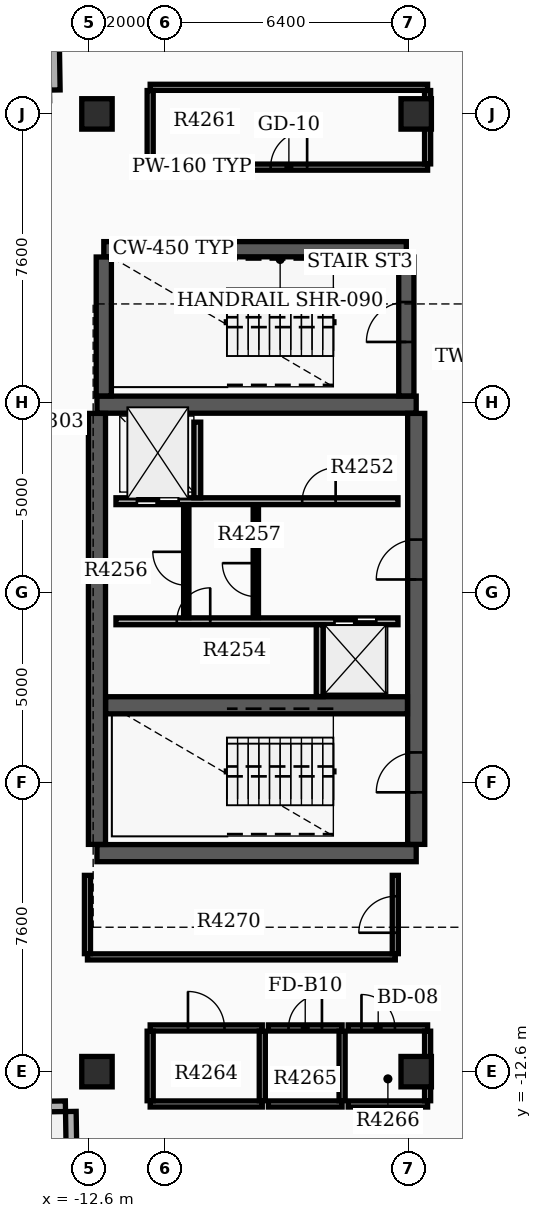
"""IFC4 building model, lengths in metres.
Left out: names, types, materials, properties, quantities, classifications, styles, units other than length and angle.
Written with IfcOpenShell. Run it as: python <this file> out.ifc"""

import sys

from ifc_helpers import new_model, si_unit, direction, frame, frame_2d, origin, origin_2d, place, context, subcontext, project, spatial, rectangle, extrude, element, fill, save


model = new_model("IFC4")
c1 = context("Model", 3, precision=1e-05, world=origin(), true_north=direction((0.0, 1.0)))
c2 = subcontext(c1, "Body", "Model", "MODEL_VIEW")
j1 = project(units=[si_unit("LENGTHUNIT", "METRE"), si_unit("PLANEANGLEUNIT", "RADIAN")], contexts=[c1])
p1 = place(None, origin())
s1 = spatial("IfcSite", under=j1, at=p1, CompositionType="ELEMENT")
p2 = place(p1, origin())
s2 = spatial("IfcBuilding", under=s1, at=p2, CompositionType="ELEMENT")
p3 = place(p2, frame((0.0, 0.0, 269.4)))
s3 = spatial("IfcBuildingStorey", under=s2, at=p3, CompositionType="ELEMENT", Elevation=269.4)
for number, where, z_axis, x_axis in (
    (1, (-12.4, -6.85, 0.0), (0.0, 0.0, 1.0), (1.0, 0.0, 0.0)),
    (2, (-12.4, 4.95, 0.0), (0.0, 0.0, 1.0), (1.0, 0.0, 0.0)),
):
    element("IfcWall", number, at=place(p3, frame(where, z_axis=z_axis, x_axis=x_axis)), inside=s3, PredefinedType="SHEAR", context=c2, shape_type="SweptSolid", body=[
        extrude(rectangle(XDim=8.4, YDim=0.45, at=frame_2d((4.2, 0.0))), origin(), (0.0, 0.0, 1.0), 3.7),
    ])
p4 = place(p3, frame((-12.4, -6.62, 0.0), z_axis=(0.0, 0.0, 1.0), x_axis=(0.0, 1.0, 0.0)))
e3 = element("IfcWall", 3, at=p4, inside=s3, PredefinedType="SHEAR", context=c2, shape_type="SweptSolid", body=[
    extrude(rectangle(XDim=11.34, YDim=0.45, at=frame_2d((5.67, 0.0))), origin(), (0.0, 0.0, 1.0), 3.7),
])
p5 = place(p3, frame((-4.0, -6.62, 0.0), z_axis=(0.0, 0.0, 1.0), x_axis=(0.0, 1.0, 0.0)))
e4 = element("IfcWall", 4, at=p5, inside=s3, PredefinedType="SHEAR", context=c2, shape_type="SweptSolid", body=[
    extrude(rectangle(XDim=11.34, YDim=0.45, at=frame_2d((5.67, 0.0))), origin(), (0.0, 0.0, 1.0), 3.7),
])
p6 = place(p5, frame((1.37, 0.0, 0.0)))
e5 = element("IfcOpeningElement", 5, at=p6, cuts=e4, PredefinedType="OPENING", context=c2, shape_type="SweptSolid", body=[
    extrude(rectangle(XDim=1.05, YDim=2.15, at=frame_2d((0.525, 1.075))), frame((0.0, 0.235, 0.0), z_axis=(0.0, -1.0, 0.0), x_axis=(1.0, 0.0, 0.0)), (0.0, 0.0, 1.0), 0.47),
])
p7 = place(p5, frame((6.97, 0.0, 0.0)))
e6 = element("IfcOpeningElement", 6, at=p7, cuts=e4, PredefinedType="OPENING", context=c2, shape_type="SweptSolid", body=[
    extrude(rectangle(XDim=1.05, YDim=2.15, at=frame_2d((0.525, 1.075))), frame((0.0, 0.235, 0.0), z_axis=(0.0, -1.0, 0.0), x_axis=(1.0, 0.0, 0.0)), (0.0, 0.0, 1.0), 0.47),
])
p8 = place(p3, frame((-12.17, -2.96, 0.0), z_axis=(0.0, 0.0, 1.0), x_axis=(1.0, 0.0, 0.0)))
e7 = element("IfcWall", 7, at=p8, inside=s3, PredefinedType="SHEAR", context=c2, shape_type="SweptSolid", body=[
    extrude(rectangle(XDim=7.94, YDim=0.45, at=frame_2d((3.97, 0.0))), origin(), (0.0, 0.0, 1.0), 3.7),
])
p9 = place(p3, frame((-12.22, 9.04, 0.0), z_axis=(0.0, 0.0, 1.0), x_axis=(1.0, 0.0, 0.0)))
e8 = element("IfcWall", 8, at=p9, inside=s3, PredefinedType="SHEAR", context=c2, shape_type="SweptSolid", body=[
    extrude(rectangle(XDim=7.96, YDim=0.4, at=frame_2d((3.98, 0.0))), origin(), (0.0, 0.0, 1.0), 3.7),
])
p10 = place(p3, frame((-12.22, 5.18, 0.0), z_axis=(0.0, 0.0, 1.0), x_axis=(0.0, 1.0, 0.0)))
e9 = element("IfcWall", 9, at=p10, inside=s3, PredefinedType="SHEAR", context=c2, shape_type="SweptSolid", body=[
    extrude(rectangle(XDim=3.655, YDim=0.4, at=frame_2d((1.828, 0.0))), origin(), (0.0, 0.0, 1.0), 3.7),
])
p11 = place(p3, frame((-4.26, 5.18, 0.0), z_axis=(0.0, 0.0, 1.0), x_axis=(0.0, 1.0, 0.0)))
e10 = element("IfcWall", 10, at=p11, inside=s3, PredefinedType="SHEAR", context=c2, shape_type="SweptSolid", body=[
    extrude(rectangle(XDim=3.655, YDim=0.4, at=frame_2d((1.828, 0.0))), origin(), (0.0, 0.0, 1.0), 3.7),
])
p12 = place(p11, frame((1.42, 0.0, 0.0)))
e11 = element("IfcOpeningElement", 11, at=p12, cuts=e10, PredefinedType="OPENING", context=c2, shape_type="SweptSolid", body=[
    extrude(rectangle(XDim=1.05, YDim=2.15, at=frame_2d((0.525, 1.075))), frame((0.0, 0.21, 0.0), z_axis=(0.0, -1.0, 0.0), x_axis=(1.0, 0.0, 0.0)), (0.0, 0.0, 1.0), 0.42),
])
for number, where, z_axis, x_axis in (
    (12, (-12.4, -12.6, 0.0), (0.0, 0.0, 1.0), (1.0, 0.0, 0.0)),
    (13, (-12.4, 12.6, 0.0), (0.0, 0.0, 1.0), (1.0, 0.0, 0.0)),
    (14, (-4.0, -12.6, 0.0), (0.0, 0.0, 1.0), (1.0, 0.0, 0.0)),
    (15, (-4.0, 12.6, 0.0), (0.0, 0.0, 1.0), (1.0, 0.0, 0.0)),
):
    element("IfcColumn", number, at=place(p3, frame(where, z_axis=z_axis, x_axis=x_axis)), inside=s3, PredefinedType="COLUMN", context=c2, shape_type="SweptSolid", body=[
        extrude(rectangle(XDim=0.8, YDim=0.8, at=origin_2d()), origin(), (0.0, 0.0, 1.0), 3.9),
    ])
p13 = place(p3, frame((-13.51, 13.229, 0.0), z_axis=(0.0, 0.0, 1.0), x_axis=(-0.015625635615, 0.999877912303, 0.0)))
e16 = element("IfcWall", 16, at=p13, inside=s3, PredefinedType="STANDARD", context=c2, shape_type="SweptSolid", body=[
    extrude(rectangle(XDim=1.5, YDim=0.28, at=frame_2d((0.75, 0.0))), origin(), (0.0, 0.0, 1.0), 3.18),
])
p14 = place(p3, frame((-14.449, -13.529, 0.0), z_axis=(0.0, 0.0, 1.0), x_axis=(0.999878147354, 0.015610587569, 0.0)))
e17 = element("IfcWall", 17, at=p14, inside=s3, PredefinedType="STANDARD", context=c2, shape_type="SweptSolid", body=[
    extrude(rectangle(XDim=1.22, YDim=0.28, at=frame_2d((0.61, 0.0))), origin(), (0.0, 0.0, 1.0), 3.18),
])
p15 = place(p3, frame((-13.087, -13.647, 0.0), z_axis=(0.0, 0.0, 1.0), x_axis=(0.015785793208, -0.999875396603, 0.0)))
e18 = element("IfcWall", 18, at=p15, inside=s3, PredefinedType="STANDARD", context=c2, shape_type="SweptSolid", body=[
    extrude(rectangle(XDim=1.5, YDim=0.28, at=frame_2d((0.75, 0.0))), origin(), (0.0, 0.0, 1.0), 3.18),
])
p16 = place(p3, frame((-11.9, 2.41, 0.0), z_axis=(0.0, 0.0, 1.0), x_axis=(1.0, 0.0, 0.0)))
e19 = element("IfcWall", 19, at=p16, inside=s3, PredefinedType="SOLIDWALL", context=c2, shape_type="SweptSolid", body=[
    extrude(rectangle(XDim=7.42, YDim=0.18, at=frame_2d((3.71, 0.0))), origin(), (0.0, 0.0, 1.0), 3.17),
])
p17 = place(p16, frame((0.55, 0.0, 0.0)))
e20 = element("IfcOpeningElement", 20, at=p17, cuts=e19, PredefinedType="OPENING", context=c2, shape_type="SweptSolid", body=[
    extrude(rectangle(XDim=1.1, YDim=2.15, at=frame_2d((0.55, 1.075))), frame((0.0, 0.1, 0.0), z_axis=(0.0, -1.0, 0.0), x_axis=(1.0, 0.0, 0.0)), (0.0, 0.0, 1.0), 0.2),
])
p18 = place(p16, frame((4.9, 0.0, 0.0)))
e21 = element("IfcOpeningElement", 21, at=p18, cuts=e19, PredefinedType="OPENING", context=c2, shape_type="SweptSolid", body=[
    extrude(rectangle(XDim=0.88, YDim=2.1, at=frame_2d((0.44, 1.05))), frame((0.0, 0.1, 0.0), z_axis=(0.0, -1.0, 0.0), x_axis=(1.0, 0.0, 0.0)), (0.0, 0.0, 1.0), 0.2),
])
p19 = place(p3, frame((-11.9, -0.75, 0.0), z_axis=(0.0, 0.0, 1.0), x_axis=(1.0, 0.0, 0.0)))
e22 = element("IfcWall", 22, at=p19, inside=s3, PredefinedType="SOLIDWALL", context=c2, shape_type="SweptSolid", body=[
    extrude(rectangle(XDim=7.42, YDim=0.18, at=frame_2d((3.71, 0.0))), origin(), (0.0, 0.0, 1.0), 3.17),
])
p20 = place(p19, frame((5.75, 0.0, 0.0)))
e23 = element("IfcOpeningElement", 23, at=p20, cuts=e22, PredefinedType="OPENING", context=c2, shape_type="SweptSolid", body=[
    extrude(rectangle(XDim=1.1, YDim=2.15, at=frame_2d((0.55, 1.075))), frame((0.0, 0.1, 0.0), z_axis=(0.0, -1.0, 0.0), x_axis=(1.0, 0.0, 0.0)), (0.0, 0.0, 1.0), 0.2),
])
p21 = place(p19, frame((1.6, 0.0, 0.0)))
e24 = element("IfcOpeningElement", 24, at=p21, cuts=e22, PredefinedType="OPENING", context=c2, shape_type="SweptSolid", body=[
    extrude(rectangle(XDim=0.88, YDim=2.1, at=frame_2d((0.44, 1.05))), frame((0.0, 0.1, 0.0), z_axis=(0.0, -1.0, 0.0), x_axis=(1.0, 0.0, 0.0)), (0.0, 0.0, 1.0), 0.2),
])
p22 = place(p3, frame((-9.76, 2.5, 0.0), z_axis=(0.0, 0.0, 1.0), x_axis=(0.0, 1.0, 0.0)))
e25 = element("IfcWall", 25, at=p22, inside=s3, PredefinedType="SOLIDWALL", context=c2, shape_type="SweptSolid", body=[
    extrude(rectangle(XDim=1.99, YDim=0.18, at=frame_2d((0.995, 0.0))), origin(), (0.0, 0.0, 1.0), 3.17),
])
p23 = place(p3, frame((-6.54, -2.73, 0.0), z_axis=(0.0, 0.0, 1.0), x_axis=(0.0, 1.0, 0.0)))
e26 = element("IfcWall", 26, at=p23, inside=s3, PredefinedType="SOLIDWALL", context=c2, shape_type="SweptSolid", body=[
    extrude(rectangle(XDim=1.89, YDim=0.18, at=frame_2d((0.945, 0.0))), origin(), (0.0, 0.0, 1.0), 3.17),
])
p24 = place(p3, frame((-8.22, -0.65, 0.0), z_axis=(0.0, 0.0, 1.0), x_axis=(0.0, 1.0, 0.0)))
e27 = element("IfcWall", 27, at=p24, inside=s3, PredefinedType="SOLIDWALL", context=c2, shape_type="SweptSolid", body=[
    extrude(rectangle(XDim=2.96, YDim=0.14, at=frame_2d((1.48, 0.0))), origin(), (0.0, 0.0, 1.0), 3.17),
])
p25 = place(p24, frame((0.55, 0.0, 0.0)))
e28 = element("IfcOpeningElement", 28, at=p25, cuts=e27, PredefinedType="OPENING", context=c2, shape_type="SweptSolid", body=[
    extrude(rectangle(XDim=0.88, YDim=2.1, at=frame_2d((0.44, 1.05))), frame((0.0, 0.08, 0.0), z_axis=(0.0, -1.0, 0.0), x_axis=(1.0, 0.0, 0.0)), (0.0, 0.0, 1.0), 0.16),
])
p26 = place(p3, frame((-10.05, -0.652, 0.0), z_axis=(0.0, 0.0, 1.0), x_axis=(0.0, 1.0, 0.0)))
e29 = element("IfcWall", 29, at=p26, inside=s3, PredefinedType="PARTITIONING", context=c2, shape_type="SweptSolid", body=[
    extrude(rectangle(XDim=2.962, YDim=0.14, at=frame_2d((1.481, 0.0))), origin(), (0.0, 0.0, 1.0), 3.17),
])
p27 = place(p26, frame((0.85, 0.0, 0.0)))
e30 = element("IfcOpeningElement", 30, at=p27, cuts=e29, PredefinedType="OPENING", context=c2, shape_type="SweptSolid", body=[
    extrude(rectangle(XDim=0.88, YDim=2.1, at=frame_2d((0.44, 1.05))), frame((0.0, 0.08, 0.0), z_axis=(0.0, -1.0, 0.0), x_axis=(1.0, 0.0, 0.0)), (0.0, 0.0, 1.0), 0.16),
])
p28 = place(p3, frame((-11.0, 11.2, 0.0), z_axis=(0.0, 0.0, 1.0), x_axis=(1.0, 0.0, 0.0)))
e31 = element("IfcWall", 31, at=p28, inside=s3, PredefinedType="PARTITIONING", context=c2, shape_type="SweptSolid", body=[
    extrude(rectangle(XDim=7.3, YDim=0.16, at=frame_2d((3.65, 0.0))), origin(), (0.0, 0.0, 1.0), 3.17),
])
p29 = place(p28, frame((3.17, 0.0, 0.0)))
e32 = element("IfcOpeningElement", 32, at=p29, cuts=e31, PredefinedType="OPENING", context=c2, shape_type="SweptSolid", body=[
    extrude(rectangle(XDim=0.96, YDim=2.15, at=frame_2d((0.48, 1.075))), frame((0.0, 0.09, 0.0), z_axis=(0.0, -1.0, 0.0), x_axis=(1.0, 0.0, 0.0)), (0.0, 0.0, 1.0), 0.18),
])
p30 = place(p3, frame((-11.0, 13.3, 0.0), z_axis=(0.0, 0.0, 1.0), x_axis=(1.0, 0.0, 0.0)))
e33 = element("IfcWall", 33, at=p30, inside=s3, PredefinedType="PARTITIONING", context=c2, shape_type="SweptSolid", body=[
    extrude(rectangle(XDim=7.3, YDim=0.16, at=frame_2d((3.65, 0.0))), origin(), (0.0, 0.0, 1.0), 3.17),
])
for number, where, z_axis, x_axis in (
    (34, (-11.0, 11.285, 0.0), (0.0, 0.0, 1.0), (0.0, 1.0, 0.0)),
    (35, (-3.7, 11.285, 0.0), (0.0, 0.0, 1.0), (0.0, 1.0, 0.0)),
):
    element("IfcWall", number, at=place(p3, frame(where, z_axis=z_axis, x_axis=x_axis)), inside=s3, PredefinedType="PARTITIONING", context=c2, shape_type="SweptSolid", body=[
        extrude(rectangle(XDim=1.93, YDim=0.16, at=frame_2d((0.965, 0.0))), origin(), (0.0, 0.0, 1.0), 3.17),
    ])
p31 = place(p3, frame((-11.0, -13.45, 0.0), z_axis=(0.0, 0.0, 1.0), x_axis=(1.0, 0.0, 0.0)))
e36 = element("IfcWall", 36, at=p31, inside=s3, PredefinedType="PARTITIONING", context=c2, shape_type="SweptSolid", body=[
    extrude(rectangle(XDim=2.95, YDim=0.16, at=frame_2d((1.475, 0.0))), origin(), (0.0, 0.0, 1.0), 3.17),
])
p32 = place(p3, frame((-11.0, -11.45, 0.0), z_axis=(0.0, 0.0, 1.0), x_axis=(1.0, 0.0, 0.0)))
e37 = element("IfcWall", 37, at=p32, inside=s3, PredefinedType="PARTITIONING", context=c2, shape_type="SweptSolid", body=[
    extrude(rectangle(XDim=2.95, YDim=0.16, at=frame_2d((1.475, 0.0))), origin(), (0.0, 0.0, 1.0), 3.17),
])
p33 = place(p32, frame((0.995, 0.0, 0.0)))
e38 = element("IfcOpeningElement", 38, at=p33, cuts=e37, PredefinedType="OPENING", context=c2, shape_type="SweptSolid", body=[
    extrude(rectangle(XDim=0.96, YDim=2.15, at=frame_2d((0.48, 1.075))), frame((0.0, 0.09, 0.0), z_axis=(0.0, -1.0, 0.0), x_axis=(1.0, 0.0, 0.0)), (0.0, 0.0, 1.0), 0.18),
])
for number, where, z_axis, x_axis in (
    (39, (-11.0, -13.365, 0.0), (0.0, 0.0, 1.0), (0.0, 1.0, 0.0)),
    (40, (-8.05, -13.365, 0.0), (0.0, 0.0, 1.0), (0.0, 1.0, 0.0)),
):
    element("IfcWall", number, at=place(p3, frame(where, z_axis=z_axis, x_axis=x_axis)), inside=s3, PredefinedType="PARTITIONING", context=c2, shape_type="SweptSolid", body=[
        extrude(rectangle(XDim=1.83, YDim=0.16, at=frame_2d((0.915, 0.0))), origin(), (0.0, 0.0, 1.0), 3.17),
    ])
p34 = place(p3, frame((-7.89, -13.45, 0.0), z_axis=(0.0, 0.0, 1.0), x_axis=(1.0, 0.0, 0.0)))
e41 = element("IfcWall", 41, at=p34, inside=s3, PredefinedType="PARTITIONING", context=c2, shape_type="SweptSolid", body=[
    extrude(rectangle(XDim=1.94, YDim=0.16, at=frame_2d((0.97, 0.0))), origin(), (0.0, 0.0, 1.0), 3.17),
])
p35 = place(p3, frame((-7.89, -11.45, 0.0), z_axis=(0.0, 0.0, 1.0), x_axis=(1.0, 0.0, 0.0)))
e42 = element("IfcWall", 42, at=p35, inside=s3, PredefinedType="PARTITIONING", context=c2, shape_type="SweptSolid", body=[
    extrude(rectangle(XDim=1.94, YDim=0.16, at=frame_2d((0.97, 0.0))), origin(), (0.0, 0.0, 1.0), 3.17),
])
p36 = place(p35, frame((0.53, 0.0, 0.0)))
e43 = element("IfcOpeningElement", 43, at=p36, cuts=e42, PredefinedType="OPENING", context=c2, shape_type="SweptSolid", body=[
    extrude(rectangle(XDim=0.88, YDim=2.1, at=frame_2d((0.44, 1.05))), frame((0.0, 0.09, 0.0), z_axis=(0.0, -1.0, 0.0), x_axis=(1.0, 0.0, 0.0)), (0.0, 0.0, 1.0), 0.18),
])
p37 = place(p3, frame((-5.95, -13.365, 0.0), z_axis=(0.0, 0.0, 1.0), x_axis=(0.0, 1.0, 0.0)))
e44 = element("IfcWall", 44, at=p37, inside=s3, PredefinedType="PARTITIONING", context=c2, shape_type="SweptSolid", body=[
    extrude(rectangle(XDim=1.83, YDim=0.16, at=frame_2d((0.915, 0.0))), origin(), (0.0, 0.0, 1.0), 3.17),
])
p38 = place(p3, frame((-5.79, -13.45, 0.0), z_axis=(0.0, 0.0, 1.0), x_axis=(1.0, 0.0, 0.0)))
e45 = element("IfcWall", 45, at=p38, inside=s3, PredefinedType="PARTITIONING", context=c2, shape_type="SweptSolid", body=[
    extrude(rectangle(XDim=2.09, YDim=0.16, at=frame_2d((1.045, 0.0))), origin(), (0.0, 0.0, 1.0), 3.17),
])
p39 = place(p3, frame((-5.79, -11.45, 0.0), z_axis=(0.0, 0.0, 1.0), x_axis=(1.0, 0.0, 0.0)))
e46 = element("IfcWall", 46, at=p39, inside=s3, PredefinedType="PARTITIONING", context=c2, shape_type="SweptSolid", body=[
    extrude(rectangle(XDim=2.09, YDim=0.16, at=frame_2d((1.045, 0.0))), origin(), (0.0, 0.0, 1.0), 3.17),
])
p40 = place(p39, frame((0.35, 0.0, 0.0)))
e47 = element("IfcOpeningElement", 47, at=p40, cuts=e46, PredefinedType="OPENING", context=c2, shape_type="SweptSolid", body=[
    extrude(rectangle(XDim=0.88, YDim=2.15, at=frame_2d((0.44, 1.075))), frame((0.0, 0.09, 0.0), z_axis=(0.0, -1.0, 0.0), x_axis=(1.0, 0.0, 0.0)), (0.0, 0.0, 1.0), 0.18),
])
p41 = place(p3, frame((-3.7, -13.365, 0.0), z_axis=(0.0, 0.0, 1.0), x_axis=(0.0, 1.0, 0.0)))
e48 = element("IfcWall", 48, at=p41, inside=s3, PredefinedType="PARTITIONING", context=c2, shape_type="SweptSolid", body=[
    extrude(rectangle(XDim=1.83, YDim=0.16, at=frame_2d((0.915, 0.0))), origin(), (0.0, 0.0, 1.0), 3.17),
])
p42 = place(p3, frame((-12.65, -9.58, 0.0), z_axis=(0.0, 0.0, 1.0), x_axis=(1.0, 0.0, 0.0)))
e49 = element("IfcWall", 49, at=p42, inside=s3, PredefinedType="PARTITIONING", context=c2, shape_type="SweptSolid", body=[
    extrude(rectangle(XDim=8.1, YDim=0.16, at=frame_2d((4.05, 0.0))), origin(), (0.0, 0.0, 1.0), 3.17),
])
p43 = place(p3, frame((-12.65, -9.495, 0.0), z_axis=(0.0, 0.0, 1.0), x_axis=(0.0, 1.0, 0.0)))
e50 = element("IfcWall", 50, at=p43, inside=s3, PredefinedType="PARTITIONING", context=c2, shape_type="SweptSolid", body=[
    extrude(rectangle(XDim=2.06, YDim=0.16, at=frame_2d((1.03, 0.0))), origin(), (0.0, 0.0, 1.0), 3.17),
])
p44 = place(p3, frame((-4.55, -9.495, 0.0), z_axis=(0.0, 0.0, 1.0), x_axis=(0.0, 1.0, 0.0)))
e51 = element("IfcWall", 51, at=p44, inside=s3, PredefinedType="PARTITIONING", context=c2, shape_type="SweptSolid", body=[
    extrude(rectangle(XDim=2.06, YDim=0.16, at=frame_2d((1.03, 0.0))), origin(), (0.0, 0.0, 1.0), 3.17),
])
p45 = place(p44, frame((0.55, 0.0, 0.0)))
e52 = element("IfcOpeningElement", 52, at=p45, cuts=e51, PredefinedType="OPENING", context=c2, shape_type="SweptSolid", body=[
    extrude(rectangle(XDim=0.96, YDim=2.15, at=frame_2d((0.48, 1.075))), frame((0.0, 0.09, 0.0), z_axis=(0.0, -1.0, 0.0), x_axis=(1.0, 0.0, 0.0)), (0.0, 0.0, 1.0), 0.18),
])
p46 = place(p6, origin())
e53 = element("IfcDoor", 53, at=p46, inside=s3, OperationType="SINGLE_SWING_LEFT", PredefinedType="DOOR", context=c2, shape_type="SweptSolid", body=[
    extrude(rectangle(XDim=1.05, YDim=2.15, at=frame_2d((0.525, 1.075))), frame((0.0, 0.025, 0.0), z_axis=(0.0, -1.0, 0.0), x_axis=(1.0, 0.0, 0.0)), (0.0, 0.0, 1.0), 0.05),
])
fill(e5, e53)
p47 = place(p7, origin())
e54 = element("IfcDoor", 54, at=p47, inside=s3, OperationType="SINGLE_SWING_LEFT", PredefinedType="DOOR", context=c2, shape_type="SweptSolid", body=[
    extrude(rectangle(XDim=1.05, YDim=2.15, at=frame_2d((0.525, 1.075))), frame((0.0, 0.025, 0.0), z_axis=(0.0, -1.0, 0.0), x_axis=(1.0, 0.0, 0.0)), (0.0, 0.0, 1.0), 0.05),
])
fill(e6, e54)
p48 = place(p12, origin())
e55 = element("IfcDoor", 55, at=p48, inside=s3, OperationType="SINGLE_SWING_LEFT", PredefinedType="DOOR", context=c2, shape_type="SweptSolid", body=[
    extrude(rectangle(XDim=1.05, YDim=2.15, at=frame_2d((0.525, 1.075))), frame((0.0, 0.025, 0.0), z_axis=(0.0, -1.0, 0.0), x_axis=(1.0, 0.0, 0.0)), (0.0, 0.0, 1.0), 0.05),
])
fill(e11, e55)
p49 = place(p17, origin())
e56 = element("IfcDoor", 56, at=p49, inside=s3, OperationType="DOUBLE_DOOR_SLIDING", PredefinedType="DOOR", context=c2, shape_type="SweptSolid", body=[
    extrude(rectangle(XDim=1.1, YDim=2.15, at=frame_2d((0.55, 1.075))), frame((0.0, 0.025, 0.0), z_axis=(0.0, -1.0, 0.0), x_axis=(1.0, 0.0, 0.0)), (0.0, 0.0, 1.0), 0.05),
])
fill(e20, e56)
p50 = place(p20, origin())
e57 = element("IfcDoor", 57, at=p50, inside=s3, OperationType="DOUBLE_DOOR_SLIDING", PredefinedType="DOOR", context=c2, shape_type="SweptSolid", body=[
    extrude(rectangle(XDim=1.1, YDim=2.15, at=frame_2d((0.55, 1.075))), frame((0.0, 0.025, 0.0), z_axis=(0.0, -1.0, 0.0), x_axis=(1.0, 0.0, 0.0)), (0.0, 0.0, 1.0), 0.05),
])
fill(e23, e57)
p51 = place(p18, origin())
e58 = element("IfcDoor", 58, at=p51, inside=s3, OperationType="SINGLE_SWING_RIGHT", PredefinedType="DOOR", context=c2, shape_type="SweptSolid", body=[
    extrude(rectangle(XDim=0.88, YDim=2.1, at=frame_2d((0.44, 1.05))), frame((0.0, 0.025, 0.0), z_axis=(0.0, -1.0, 0.0), x_axis=(1.0, 0.0, 0.0)), (0.0, 0.0, 1.0), 0.05),
])
fill(e21, e58)
p52 = place(p21, origin())
e59 = element("IfcDoor", 59, at=p52, inside=s3, OperationType="SINGLE_SWING_RIGHT", PredefinedType="DOOR", context=c2, shape_type="SweptSolid", body=[
    extrude(rectangle(XDim=0.88, YDim=2.1, at=frame_2d((0.44, 1.05))), frame((0.0, 0.025, 0.0), z_axis=(0.0, -1.0, 0.0), x_axis=(1.0, 0.0, 0.0)), (0.0, 0.0, 1.0), 0.05),
])
fill(e24, e59)
p53 = place(p25, origin())
e60 = element("IfcDoor", 60, at=p53, inside=s3, OperationType="SINGLE_SWING_RIGHT", PredefinedType="DOOR", context=c2, shape_type="SweptSolid", body=[
    extrude(rectangle(XDim=0.88, YDim=2.1, at=frame_2d((0.44, 1.05))), frame((0.0, 0.025, 0.0), z_axis=(0.0, -1.0, 0.0), x_axis=(1.0, 0.0, 0.0)), (0.0, 0.0, 1.0), 0.05),
])
fill(e28, e60)
p54 = place(p27, origin())
e61 = element("IfcDoor", 61, at=p54, inside=s3, OperationType="SINGLE_SWING_RIGHT", PredefinedType="DOOR", context=c2, shape_type="SweptSolid", body=[
    extrude(rectangle(XDim=0.88, YDim=2.1, at=frame_2d((0.44, 1.05))), frame((0.0, 0.025, 0.0), z_axis=(0.0, -1.0, 0.0), x_axis=(1.0, 0.0, 0.0)), (0.0, 0.0, 1.0), 0.05),
])
fill(e30, e61)
p55 = place(p29, origin())
e62 = element("IfcDoor", 62, at=p55, inside=s3, OperationType="SINGLE_SWING_RIGHT", PredefinedType="DOOR", context=c2, shape_type="SweptSolid", body=[
    extrude(rectangle(XDim=0.96, YDim=2.15, at=frame_2d((0.48, 1.075))), frame((0.0, 0.025, 0.0), z_axis=(0.0, -1.0, 0.0), x_axis=(1.0, 0.0, 0.0)), (0.0, 0.0, 1.0), 0.05),
])
fill(e32, e62)
p56 = place(p33, origin())
e63 = element("IfcDoor", 63, at=p56, inside=s3, OperationType="SINGLE_SWING_LEFT", PredefinedType="DOOR", context=c2, shape_type="SweptSolid", body=[
    extrude(rectangle(XDim=0.96, YDim=2.15, at=frame_2d((0.48, 1.075))), frame((0.0, 0.025, 0.0), z_axis=(0.0, -1.0, 0.0), x_axis=(1.0, 0.0, 0.0)), (0.0, 0.0, 1.0), 0.05),
])
fill(e38, e63)
p57 = place(p36, origin())
e64 = element("IfcDoor", 64, at=p57, inside=s3, OperationType="SINGLE_SWING_RIGHT", PredefinedType="DOOR", context=c2, shape_type="SweptSolid", body=[
    extrude(rectangle(XDim=0.88, YDim=2.1, at=frame_2d((0.44, 1.05))), frame((0.0, 0.025, 0.0), z_axis=(0.0, -1.0, 0.0), x_axis=(1.0, 0.0, 0.0)), (0.0, 0.0, 1.0), 0.05),
])
fill(e43, e64)
p58 = place(p40, origin())
e65 = element("IfcDoor", 65, at=p58, inside=s3, OperationType="SINGLE_SWING_LEFT", PredefinedType="DOOR", context=c2, shape_type="SweptSolid", body=[
    extrude(rectangle(XDim=0.88, YDim=2.15, at=frame_2d((0.44, 1.075))), frame((0.0, 0.025, 0.0), z_axis=(0.0, -1.0, 0.0), x_axis=(1.0, 0.0, 0.0)), (0.0, 0.0, 1.0), 0.05),
])
fill(e47, e65)
p59 = place(p45, origin())
e66 = element("IfcDoor", 66, at=p59, inside=s3, OperationType="SINGLE_SWING_LEFT", PredefinedType="DOOR", context=c2, shape_type="SweptSolid", body=[
    extrude(rectangle(XDim=0.96, YDim=2.15, at=frame_2d((0.48, 1.075))), frame((0.0, 0.025, 0.0), z_axis=(0.0, -1.0, 0.0), x_axis=(1.0, 0.0, 0.0)), (0.0, 0.0, 1.0), 0.05),
])
fill(e52, e66)
save(model, sys.argv[1])
